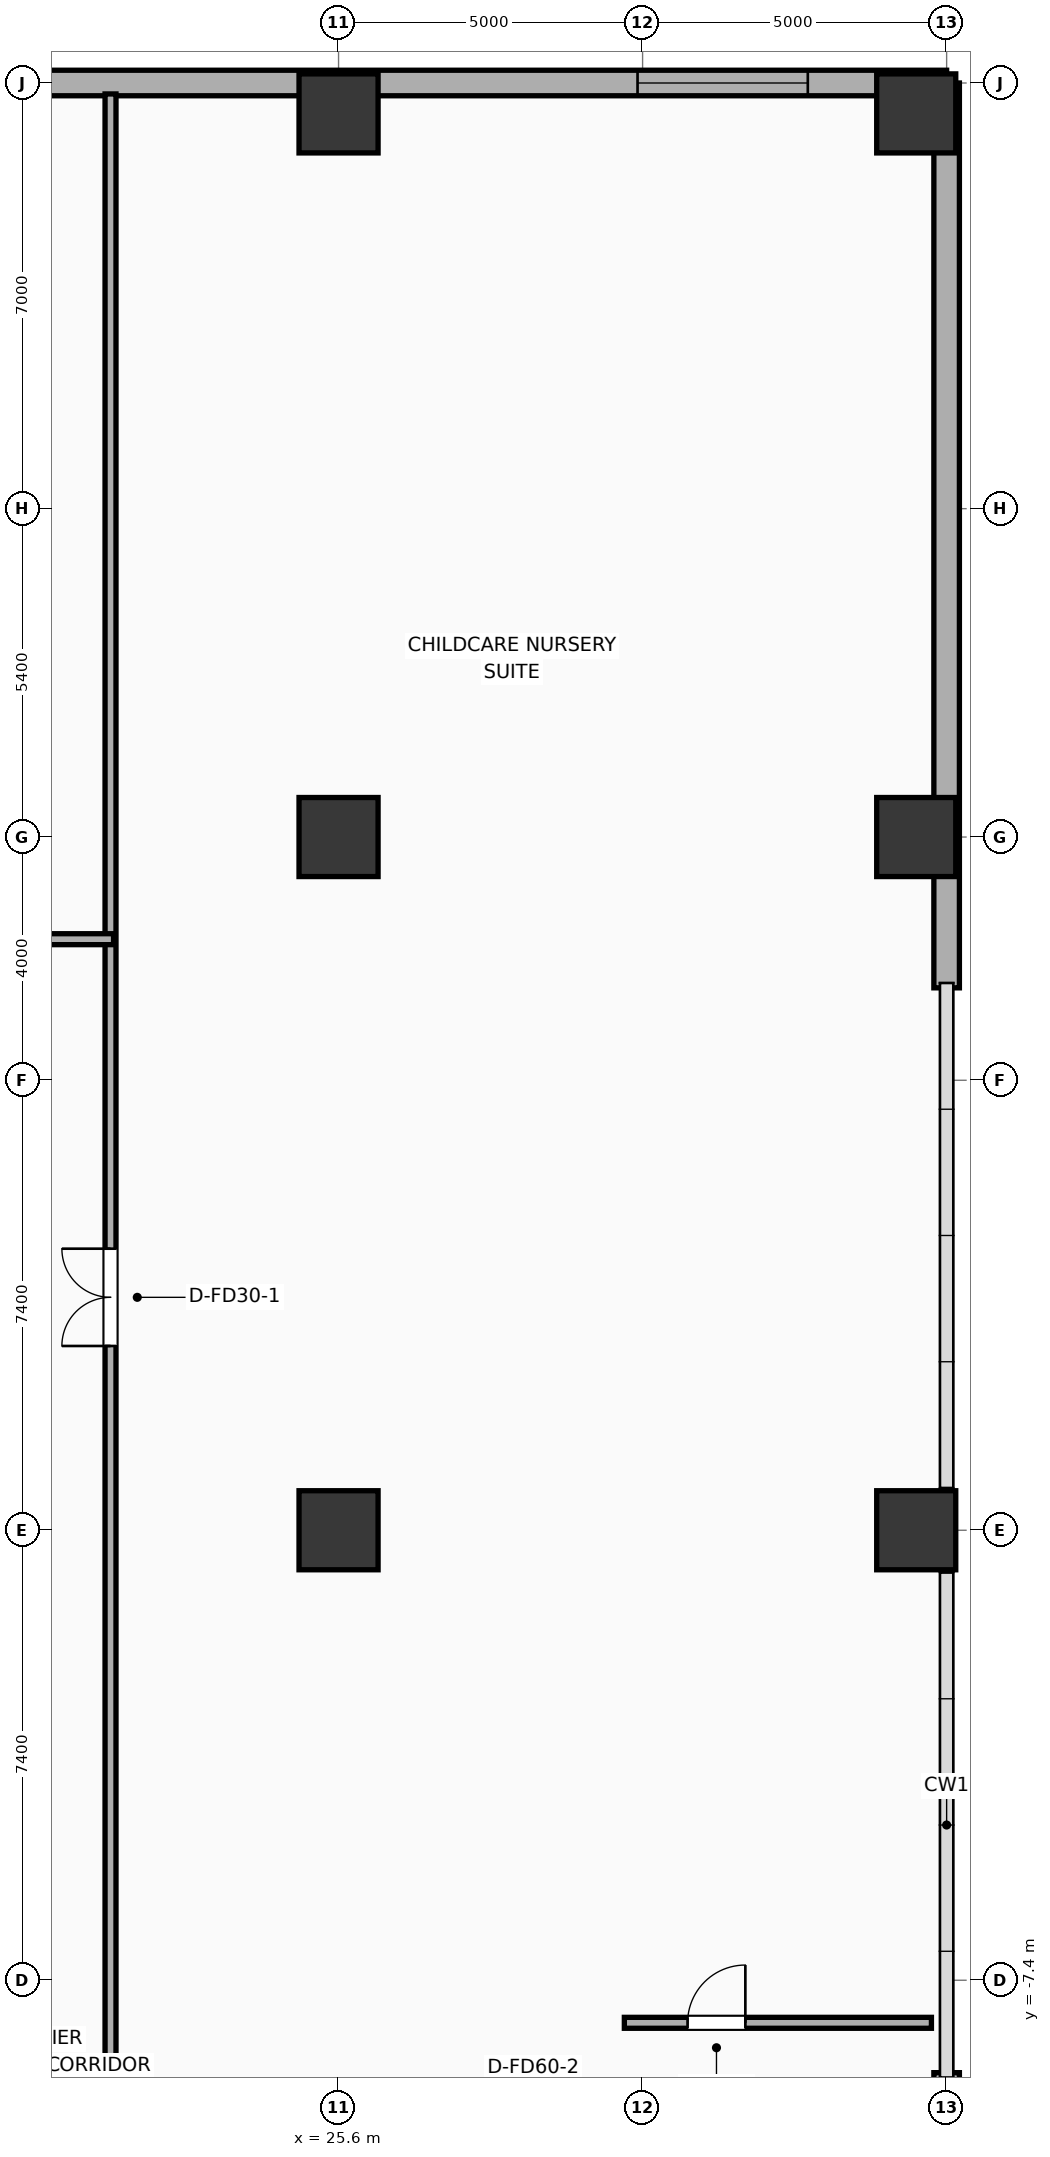
"""IFC4 building model, lengths in metres.
Left out: names, types, materials, properties, quantities, classifications, styles, units other than length and angle.
Written with IfcOpenShell. Run it as: python <this file> out.ifc"""

import sys

from ifc_helpers import new_model, si_unit, direction, frame, frame_2d, origin, origin_2d, place, context, subcontext, project, spatial, rectangle, extrude, element, fill, save


model = new_model("IFC4")
c1 = context("Model", 3, precision=1e-05, world=origin(), true_north=direction((0.0, 1.0)))
c2 = subcontext(c1, "Body", "Model", "MODEL_VIEW")
j1 = project(units=[si_unit("LENGTHUNIT", "METRE"), si_unit("PLANEANGLEUNIT", "RADIAN")], contexts=[c1])
p1 = place(None, origin())
s1 = spatial("IfcSite", under=j1, at=p1, CompositionType="ELEMENT")
p2 = place(p1, origin())
s2 = spatial("IfcBuilding", under=s1, at=p2, CompositionType="ELEMENT")
p3 = place(p2, frame((0.0, 0.0, 15.6)))
s3 = spatial("IfcBuildingStorey", under=s2, at=p3, CompositionType="ELEMENT", Elevation=15.6)
for number, where, z_axis, x_axis in (
    (1, (25.6, 0.0, 0.0), (0.0, 0.0, 1.0), (1.0, 0.0, 0.0)),
    (2, (25.6, 11.4, 0.0), (0.0, 0.0, 1.0), (1.0, 0.0, 0.0)),
    (3, (25.6, 23.3, 0.0), (0.0, 0.0, 1.0), (1.0, 0.0, 0.0)),
    (4, (35.1, 0.0, 0.0), (0.0, 0.0, 1.0), (1.0, 0.0, 0.0)),
    (5, (35.1, 11.4, 0.0), (0.0, 0.0, 1.0), (1.0, 0.0, 0.0)),
    (6, (35.1, 23.3, 0.0), (0.0, 0.0, 1.0), (1.0, 0.0, 0.0)),
):
    element("IfcColumn", number, at=place(p3, frame(where, z_axis=z_axis, x_axis=x_axis)), inside=s3, PredefinedType="COLUMN", context=c2, shape_type="SweptSolid", body=[
        extrude(rectangle(XDim=1.3, YDim=1.3, at=origin_2d()), origin(), (0.0, 0.0, 1.0), 5.2),
    ])
for number, where, z_axis, x_axis in (
    (7, (35.6, -23.8, 0.0), (0.0, 0.0, 1.0), (0.0, 1.0, 0.0)),
    (8, (35.6, 8.92, 0.0), (0.0, 0.0, 1.0), (0.0, 1.0, 0.0)),
):
    element("IfcWall", number, at=place(p3, frame(where, z_axis=z_axis, x_axis=x_axis)), inside=s3, PredefinedType="ELEMENTEDWALL", context=c2, shape_type="SweptSolid", body=[
        extrude(rectangle(XDim=14.88, YDim=0.42, at=frame_2d((7.44, 0.0))), origin(), (0.0, 0.0, 1.0), 4.8),
    ])
p4 = place(p3, frame((35.6, 23.8, 0.0), z_axis=(0.0, 0.0, 1.0), x_axis=(-1.0, 0.0, 0.0)))
e9 = element("IfcWall", 9, at=p4, inside=s3, PredefinedType="ELEMENTEDWALL", context=c2, shape_type="SweptSolid", body=[
    extrude(rectangle(XDim=22.1, YDim=0.42, at=frame_2d((11.05, 0.0))), origin(), (0.0, 0.0, 1.0), 4.8),
])
p5 = place(p4, frame((2.283, 0.0, 0.65)))
e10 = element("IfcOpeningElement", 10, at=p5, cuts=e9, PredefinedType="OPENING", context=c2, shape_type="SweptSolid", body=[
    extrude(rectangle(XDim=2.8, YDim=2.6, at=frame_2d((1.4, 1.3))), frame((0.0, 0.22, 0.0), z_axis=(0.0, -1.0, 0.0), x_axis=(1.0, 0.0, 0.0)), (0.0, 0.0, 1.0), 0.44),
])
p6 = place(p4, frame((17.017, 0.0, 0.65)))
e11 = element("IfcOpeningElement", 11, at=p6, cuts=e9, PredefinedType="OPENING", context=c2, shape_type="SweptSolid", body=[
    extrude(rectangle(XDim=2.8, YDim=2.6, at=frame_2d((1.4, 1.3))), frame((0.0, 0.22, 0.0), z_axis=(0.0, -1.0, 0.0), x_axis=(1.0, 0.0, 0.0)), (0.0, 0.0, 1.0), 0.44),
])
p7 = place(p3, frame((21.85, -10.5, 0.0), z_axis=(0.0, 0.0, 1.0), x_axis=(0.0, 1.0, 0.0)))
e12 = element("IfcWall", 12, at=p7, inside=s3, PredefinedType="PARTITIONING", context=c2, shape_type="SweptSolid", body=[
    extrude(rectangle(XDim=34.12, YDim=0.18, at=frame_2d((17.06, 0.0))), origin(), (0.0, 0.0, 1.0), 4.8),
])
p8 = place(p7, frame((13.531, 0.0, 0.0)))
e13 = element("IfcOpeningElement", 13, at=p8, cuts=e12, PredefinedType="OPENING", context=c2, shape_type="SweptSolid", body=[
    extrude(rectangle(XDim=1.6, YDim=2.05, at=frame_2d((0.8, 1.025))), frame((0.0, 0.1, 0.0), z_axis=(0.0, -1.0, 0.0), x_axis=(1.0, 0.0, 0.0)), (0.0, 0.0, 1.0), 0.2),
])
p9 = place(p3, frame((30.3, -8.1, 0.0), z_axis=(0.0, 0.0, 1.0), x_axis=(1.0, 0.0, 0.0)))
e14 = element("IfcWall", 14, at=p9, inside=s3, PredefinedType="PARTITIONING", context=c2, shape_type="SweptSolid", body=[
    extrude(rectangle(XDim=5.05, YDim=0.18, at=frame_2d((2.525, 0.0))), origin(), (0.0, 0.0, 1.0), 4.8),
])
p10 = place(p9, frame((1.04, 0.0, 0.0)))
e15 = element("IfcOpeningElement", 15, at=p10, cuts=e14, PredefinedType="OPENING", context=c2, shape_type="SweptSolid", body=[
    extrude(rectangle(XDim=0.95, YDim=2.05, at=frame_2d((0.475, 1.025))), frame((0.0, 0.1, 0.0), z_axis=(0.0, -1.0, 0.0), x_axis=(1.0, 0.0, 0.0)), (0.0, 0.0, 1.0), 0.2),
])
p11 = place(p3, frame((13.52, 9.72, 0.0), z_axis=(0.0, 0.0, 1.0), x_axis=(1.0, 0.0, 0.0)))
e16 = element("IfcWall", 16, at=p11, inside=s3, PredefinedType="PARTITIONING", context=c2, shape_type="SweptSolid", body=[
    extrude(rectangle(XDim=8.38, YDim=0.18, at=frame_2d((4.19, 0.0))), origin(), (0.0, 0.0, 1.0), 4.8),
])
p12 = place(p11, frame((3.39, 0.0, 0.0)))
e17 = element("IfcOpeningElement", 17, at=p12, cuts=e16, PredefinedType="OPENING", context=c2, shape_type="SweptSolid", body=[
    extrude(rectangle(XDim=1.6, YDim=2.05, at=frame_2d((0.8, 1.025))), frame((0.0, 0.1, 0.0), z_axis=(0.0, -1.0, 0.0), x_axis=(1.0, 0.0, 0.0)), (0.0, 0.0, 1.0), 0.2),
])
p13 = place(p5, origin())
e18 = element("IfcWindow", 18, at=p13, inside=s3, PartitioningType="SINGLE_PANEL", PredefinedType="WINDOW", context=c2, shape_type="SweptSolid", body=[
    extrude(rectangle(XDim=2.8, YDim=2.6, at=frame_2d((1.4, 1.3))), frame((0.0, 0.03, 0.0), z_axis=(0.0, -1.0, 0.0), x_axis=(1.0, 0.0, 0.0)), (0.0, 0.0, 1.0), 0.06),
])
fill(e10, e18)
p14 = place(p8, origin())
e19 = element("IfcDoor", 19, at=p14, inside=s3, OperationType="DOUBLE_DOOR_SINGLE_SWING", PredefinedType="DOOR", context=c2, shape_type="SweptSolid", body=[
    extrude(rectangle(XDim=1.6, YDim=2.05, at=frame_2d((0.8, 1.025))), frame((0.0, 0.025, 0.0), z_axis=(0.0, -1.0, 0.0), x_axis=(1.0, 0.0, 0.0)), (0.0, 0.0, 1.0), 0.05),
])
fill(e13, e19)
p15 = place(p10, origin())
e20 = element("IfcDoor", 20, at=p15, inside=s3, OperationType="SINGLE_SWING_RIGHT", PredefinedType="DOOR", context=c2, shape_type="SweptSolid", body=[
    extrude(rectangle(XDim=0.95, YDim=2.05, at=frame_2d((0.475, 1.025))), frame((0.0, 0.025, 0.0), z_axis=(0.0, -1.0, 0.0), x_axis=(1.0, 0.0, 0.0)), (0.0, 0.0, 1.0), 0.05),
])
fill(e15, e20)
save(model, sys.argv[1])
